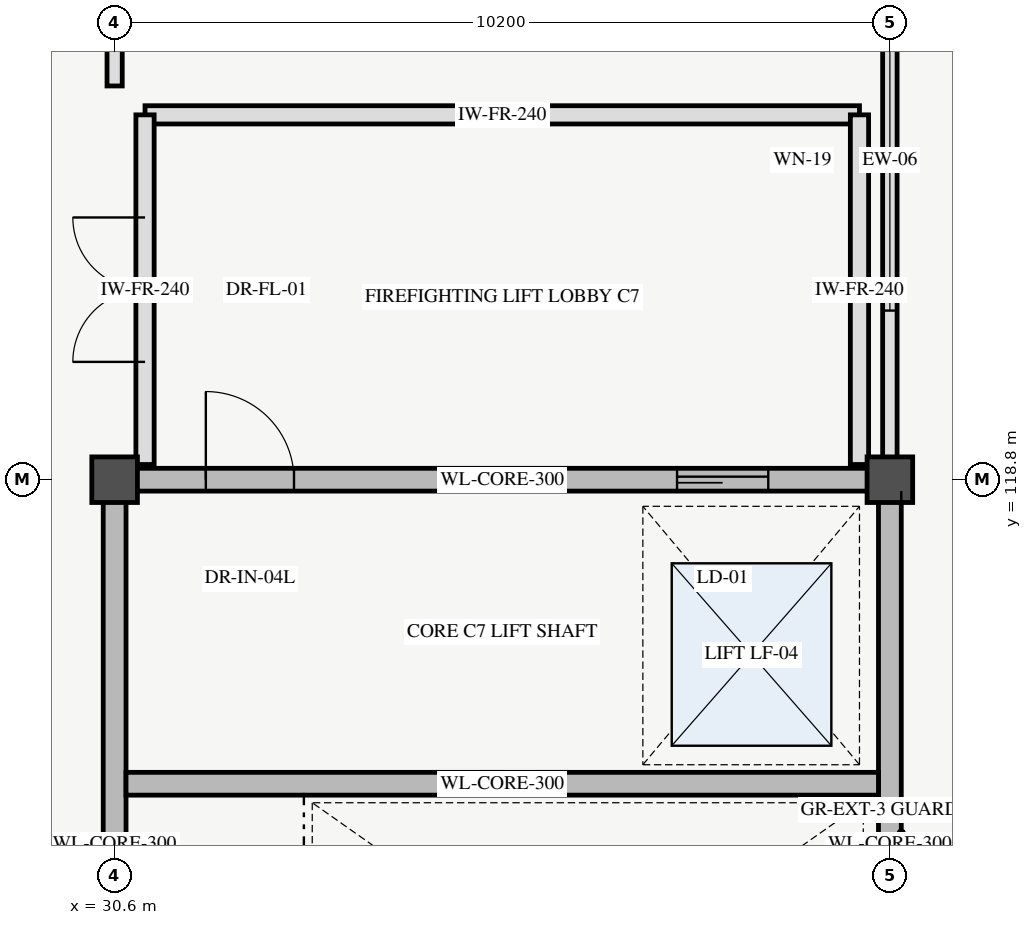
"""IFC4 building model, lengths in metres.
Left out: names, types, materials, properties, quantities, classifications, styles, units other than length and angle.
Written with IfcOpenShell. Run it as: python <this file> out.ifc"""

import sys

from ifc_helpers import new_model, si_unit, direction, frame, frame_2d, origin, origin_2d, place, context, subcontext, project, spatial, rectangle, extrude, element, fill, save


model = new_model("IFC4")
c1 = context("Model", 3, precision=1e-05, world=origin(), true_north=direction((0.0, 1.0)))
c2 = subcontext(c1, "Body", "Model", "MODEL_VIEW")
j1 = project(units=[si_unit("LENGTHUNIT", "METRE"), si_unit("PLANEANGLEUNIT", "RADIAN")], contexts=[c1])
p1 = place(None, origin())
s1 = spatial("IfcSite", under=j1, at=p1, CompositionType="ELEMENT")
p2 = place(p1, origin())
s2 = spatial("IfcBuilding", under=s1, at=p2, CompositionType="ELEMENT")
p3 = place(p2, frame((0.0, 0.0, 23.4)))
s3 = spatial("IfcBuildingStorey", under=s2, at=p3, CompositionType="ELEMENT", Elevation=23.4)
for number, where, z_axis, x_axis in (
    (1, (30.6, 118.8, 0.0), (0.0, 0.0, 1.0), (1.0, 0.0, 0.0)),
    (2, (40.8, 118.8, 0.0), (0.0, 0.0, 1.0), (1.0, 0.0, 0.0)),
):
    element("IfcColumn", number, at=place(p3, frame(where, z_axis=z_axis, x_axis=x_axis)), inside=s3, PredefinedType="COLUMN", context=c2, shape_type="SweptSolid", body=[
        extrude(rectangle(XDim=0.6, YDim=0.6, at=origin_2d()), origin(), (0.0, 0.0, 1.0), 4.2),
    ])
p4 = place(p3, frame((30.6, 118.8, 0.0), z_axis=(0.0, 0.0, 1.0), x_axis=(1.0, 0.0, 0.0)))
e3 = element("IfcWall", 3, at=p4, inside=s3, PredefinedType="SHEAR", context=c2, shape_type="SweptSolid", body=[
    extrude(rectangle(XDim=10.2, YDim=0.3, at=frame_2d((5.1, 0.0))), origin(), (0.0, 0.0, 1.0), 4.2),
])
p5 = place(p4, frame((1.2, 0.0, 0.0)))
e4 = element("IfcOpeningElement", 4, at=p5, cuts=e3, PredefinedType="OPENING", context=c2, shape_type="SweptSolid", body=[
    extrude(rectangle(XDim=1.16, YDim=2.2, at=frame_2d((0.58, 1.1))), frame((0.0, 0.16, 0.0), z_axis=(0.0, -1.0, 0.0), x_axis=(1.0, 0.0, 0.0)), (0.0, 0.0, 1.0), 0.32),
])
p6 = place(p4, frame((7.4, 0.0, 0.0)))
e5 = element("IfcOpeningElement", 5, at=p6, cuts=e3, PredefinedType="OPENING", context=c2, shape_type="SweptSolid", body=[
    extrude(rectangle(XDim=1.2, YDim=2.25, at=frame_2d((0.6, 1.125))), frame((0.0, 0.16, 0.0), z_axis=(0.0, -1.0, 0.0), x_axis=(1.0, 0.0, 0.0)), (0.0, 0.0, 1.0), 0.32),
])
for number, where, z_axis, x_axis in (
    (6, (30.6, 109.2, 0.0), (0.0, 0.0, 1.0), (0.0, 1.0, 0.0)),
    (7, (40.8, 109.2, 0.0), (0.0, 0.0, 1.0), (0.0, 1.0, 0.0)),
):
    element("IfcWall", number, at=place(p3, frame(where, z_axis=z_axis, x_axis=x_axis)), inside=s3, PredefinedType="SHEAR", context=c2, shape_type="SweptSolid", body=[
        extrude(rectangle(XDim=9.6, YDim=0.3, at=frame_2d((4.8, 0.0))), origin(), (0.0, 0.0, 1.0), 4.2),
    ])
p7 = place(p3, frame((40.8, 119.04, 0.0), z_axis=(0.0, 0.0, 1.0), x_axis=(0.0, 1.0, 0.0)))
e8 = element("IfcWall", 8, at=p7, inside=s3, PredefinedType="STANDARD", context=c2, shape_type="SweptSolid", body=[
    extrude(rectangle(XDim=7.92, YDim=0.19, at=frame_2d((3.96, 0.0))), origin(), (0.0, 0.0, 1.0), 3.06),
])
p8 = place(p7, frame((1.985, 0.0, 0.9)))
e9 = element("IfcOpeningElement", 9, at=p8, cuts=e8, PredefinedType="OPENING", context=c2, shape_type="SweptSolid", body=[
    extrude(rectangle(XDim=3.95, YDim=2.02, at=frame_2d((1.975, 1.01))), frame((0.0, 0.105, 0.0), z_axis=(0.0, -1.0, 0.0), x_axis=(1.0, 0.0, 0.0)), (0.0, 0.0, 1.0), 0.21),
])
p9 = place(p3, frame((30.75, 114.8, 0.0), z_axis=(0.0, 0.0, 1.0), x_axis=(1.0, 0.0, 0.0)))
e10 = element("IfcWall", 10, at=p9, inside=s3, PredefinedType="SHEAR", context=c2, shape_type="SweptSolid", body=[
    extrude(rectangle(XDim=9.9, YDim=0.3, at=frame_2d((4.95, 0.0))), origin(), (0.0, 0.0, 1.0), 4.2),
])
p10 = place(p3, frame((31.0, 123.6, 0.0), z_axis=(0.0, 0.0, 1.0), x_axis=(1.0, 0.0, 0.0)))
e11 = element("IfcWall", 11, at=p10, inside=s3, PredefinedType="PARTITIONING", context=c2, shape_type="SweptSolid", body=[
    extrude(rectangle(XDim=9.4, YDim=0.24, at=frame_2d((4.7, 0.0))), origin(), (0.0, 0.0, 1.0), 3.06),
])
p11 = place(p3, frame((40.4, 119.0, 0.0), z_axis=(0.0, 0.0, 1.0), x_axis=(0.0, 1.0, 0.0)))
e12 = element("IfcWall", 12, at=p11, inside=s3, PredefinedType="PARTITIONING", context=c2, shape_type="SweptSolid", body=[
    extrude(rectangle(XDim=4.6, YDim=0.24, at=frame_2d((2.3, 0.0))), origin(), (0.0, 0.0, 1.0), 3.06),
])
p12 = place(p3, frame((31.0, 119.0, 0.0), z_axis=(0.0, 0.0, 1.0), x_axis=(0.0, 1.0, 0.0)))
e13 = element("IfcWall", 13, at=p12, inside=s3, PredefinedType="PARTITIONING", context=c2, shape_type="SweptSolid", body=[
    extrude(rectangle(XDim=4.6, YDim=0.24, at=frame_2d((2.3, 0.0))), origin(), (0.0, 0.0, 1.0), 3.06),
])
p13 = place(p12, frame((1.35, 0.0, 0.0)))
e14 = element("IfcOpeningElement", 14, at=p13, cuts=e13, PredefinedType="OPENING", context=c2, shape_type="SweptSolid", body=[
    extrude(rectangle(XDim=1.9, YDim=2.25, at=frame_2d((0.95, 1.125))), frame((0.0, 0.13, 0.0), z_axis=(0.0, -1.0, 0.0), x_axis=(1.0, 0.0, 0.0)), (0.0, 0.0, 1.0), 0.26),
])
p14 = place(p3, frame((30.6, 123.98, 0.0), z_axis=(0.0, 0.0, 1.0), x_axis=(0.0, 1.0, 0.0)))
e15 = element("IfcWall", 15, at=p14, inside=s3, PredefinedType="PARTITIONING", context=c2, shape_type="SweptSolid", body=[
    extrude(rectangle(XDim=4.04, YDim=0.2, at=frame_2d((2.02, 0.0))), origin(), (0.0, 0.0, 1.0), 3.06),
])
p15 = place(p8, origin())
e16 = element("IfcWindow", 16, at=p15, inside=s3, PartitioningType="TRIPLE_PANEL_VERTICAL", PredefinedType="WINDOW", context=c2, shape_type="SweptSolid", body=[
    extrude(rectangle(XDim=3.95, YDim=2.02, at=frame_2d((1.975, 1.01))), frame((0.0, 0.03, 0.0), z_axis=(0.0, -1.0, 0.0), x_axis=(1.0, 0.0, 0.0)), (0.0, 0.0, 1.0), 0.06),
])
fill(e9, e16)
p16 = place(p5, origin())
e17 = element("IfcDoor", 17, at=p16, inside=s3, OperationType="SINGLE_SWING_LEFT", PredefinedType="DOOR", context=c2, shape_type="SweptSolid", body=[
    extrude(rectangle(XDim=1.16, YDim=2.2, at=frame_2d((0.58, 1.1))), frame((0.0, 0.025, 0.0), z_axis=(0.0, -1.0, 0.0), x_axis=(1.0, 0.0, 0.0)), (0.0, 0.0, 1.0), 0.05),
])
fill(e4, e17)
p17 = place(p6, origin())
e18 = element("IfcDoor", 18, at=p17, inside=s3, OperationType="SLIDING_TO_LEFT", PredefinedType="DOOR", context=c2, shape_type="SweptSolid", body=[
    extrude(rectangle(XDim=1.2, YDim=2.25, at=frame_2d((0.6, 1.125))), frame((0.0, 0.025, 0.0), z_axis=(0.0, -1.0, 0.0), x_axis=(1.0, 0.0, 0.0)), (0.0, 0.0, 1.0), 0.05),
])
fill(e5, e18)
p18 = place(p13, origin())
e19 = element("IfcDoor", 19, at=p18, inside=s3, OperationType="DOUBLE_DOOR_SINGLE_SWING", PredefinedType="DOOR", context=c2, shape_type="SweptSolid", body=[
    extrude(rectangle(XDim=1.9, YDim=2.25, at=frame_2d((0.95, 1.125))), frame((0.0, 0.025, 0.0), z_axis=(0.0, -1.0, 0.0), x_axis=(1.0, 0.0, 0.0)), (0.0, 0.0, 1.0), 0.05),
])
fill(e14, e19)
save(model, sys.argv[1])
